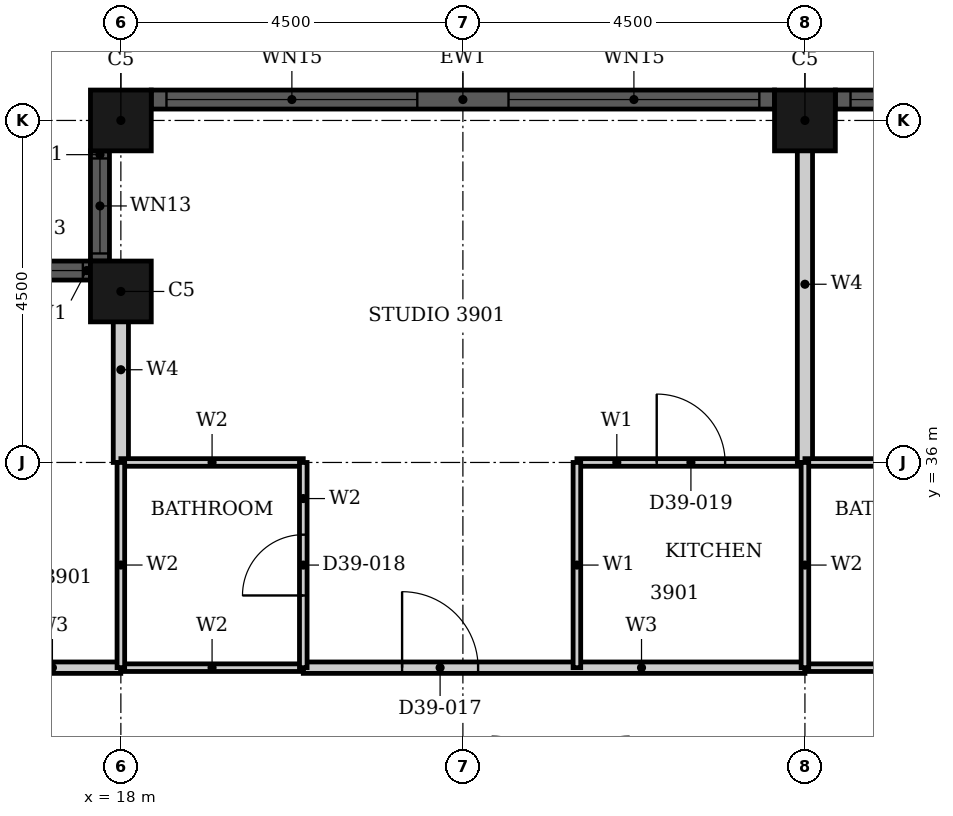
"""IFC4 building model, lengths in metres.
Left out: names, types, materials, properties, quantities, classifications, styles, units other than length and angle.
Written with IfcOpenShell. Run it as: python <this file> out.ifc"""

import sys

from ifc_helpers import new_model, si_unit, direction, frame, frame_2d, origin, origin_2d, place, context, subcontext, project, spatial, rectangle, hollow_rectangle, extrude, element, fill, save


model = new_model("IFC4")
c1 = context("Model", 3, precision=1e-05, world=origin(), true_north=direction((0.0, 1.0)))
c2 = subcontext(c1, "Body", "Model", "MODEL_VIEW")
j1 = project(units=[si_unit("LENGTHUNIT", "METRE"), si_unit("PLANEANGLEUNIT", "RADIAN")], contexts=[c1])
p1 = place(None, origin())
s1 = spatial("IfcSite", under=j1, at=p1, CompositionType="ELEMENT")
p2 = place(p1, origin())
s2 = spatial("IfcBuilding", under=s1, at=p2, CompositionType="ELEMENT")
p3 = place(p2, frame((0.0, 0.0, 158.0)))
s3 = spatial("IfcBuildingStorey", under=s2, at=p3, CompositionType="ELEMENT", Elevation=158.0)
for number, where, z_axis, x_axis in (
    (1, (27.0, 40.5, 0.0), (0.0, 0.0, 1.0), (1.0, 0.0, 0.0)),
    (2, (18.0, 40.5, 0.0), (0.0, 0.0, 1.0), (1.0, 0.0, 0.0)),
    (3, (18.0, 38.25, 0.0), (0.0, 0.0, 1.0), (1.0, 0.0, 0.0)),
):
    element("IfcColumn", number, at=place(p3, frame(where, z_axis=z_axis, x_axis=x_axis)), inside=s3, PredefinedType="COLUMN", context=c2, shape_type="SweptSolid", body=[
        extrude(hollow_rectangle(XDim=0.8, YDim=0.8, WallThickness=0.025, at=origin_2d()), origin(), (0.0, 0.0, 1.0), 3.7),
    ])
p4 = place(p3, frame((35.6, 40.775, 0.0), z_axis=(0.0, 0.0, 1.0), x_axis=(-1.0, 0.0, 0.0)))
e4 = element("IfcWall", 4, at=p4, inside=s3, PredefinedType="SOLIDWALL", context=c2, shape_type="SweptSolid", body=[
    extrude(rectangle(XDim=8.2, YDim=0.25, at=frame_2d((4.1, 0.0))), origin(), (0.0, 0.0, 1.0), 3.7),
])
p5 = place(p4, frame((0.2, 0.0, 0.45)))
e5 = element("IfcOpeningElement", 5, at=p5, cuts=e4, PredefinedType="OPENING", context=c2, shape_type="SweptSolid", body=[
    extrude(rectangle(XDim=3.3, YDim=2.3, at=frame_2d((1.65, 1.15))), frame((0.0, 0.135, 0.0), z_axis=(0.0, -1.0, 0.0), x_axis=(1.0, 0.0, 0.0)), (0.0, 0.0, 1.0), 0.27),
])
p6 = place(p4, frame((4.7, 0.0, 0.45)))
e6 = element("IfcOpeningElement", 6, at=p6, cuts=e4, PredefinedType="OPENING", context=c2, shape_type="SweptSolid", body=[
    extrude(rectangle(XDim=3.3, YDim=2.3, at=frame_2d((1.65, 1.15))), frame((0.0, 0.135, 0.0), z_axis=(0.0, -1.0, 0.0), x_axis=(1.0, 0.0, 0.0)), (0.0, 0.0, 1.0), 0.27),
])
p7 = place(p3, frame((26.6, 40.775, 0.0), z_axis=(0.0, 0.0, 1.0), x_axis=(-1.0, 0.0, 0.0)))
e7 = element("IfcWall", 7, at=p7, inside=s3, PredefinedType="SOLIDWALL", context=c2, shape_type="SweptSolid", body=[
    extrude(rectangle(XDim=8.2, YDim=0.25, at=frame_2d((4.1, 0.0))), origin(), (0.0, 0.0, 1.0), 3.7),
])
p8 = place(p7, frame((0.2, 0.0, 0.45)))
e8 = element("IfcOpeningElement", 8, at=p8, cuts=e7, PredefinedType="OPENING", context=c2, shape_type="SweptSolid", body=[
    extrude(rectangle(XDim=3.3, YDim=2.3, at=frame_2d((1.65, 1.15))), frame((0.0, 0.135, 0.0), z_axis=(0.0, -1.0, 0.0), x_axis=(1.0, 0.0, 0.0)), (0.0, 0.0, 1.0), 0.27),
])
p9 = place(p7, frame((4.7, 0.0, 0.45)))
e9 = element("IfcOpeningElement", 9, at=p9, cuts=e7, PredefinedType="OPENING", context=c2, shape_type="SweptSolid", body=[
    extrude(rectangle(XDim=3.3, YDim=2.3, at=frame_2d((1.65, 1.15))), frame((0.0, 0.135, 0.0), z_axis=(0.0, -1.0, 0.0), x_axis=(1.0, 0.0, 0.0)), (0.0, 0.0, 1.0), 0.27),
])
p10 = place(p3, frame((17.725, 40.1, 0.0), z_axis=(0.0, 0.0, 1.0), x_axis=(0.0, -1.0, 0.0)))
e10 = element("IfcWall", 10, at=p10, inside=s3, PredefinedType="SOLIDWALL", context=c2, shape_type="SweptSolid", body=[
    extrude(rectangle(XDim=1.45, YDim=0.25, at=frame_2d((0.725, 0.0))), origin(), (0.0, 0.0, 1.0), 3.7),
])
p11 = place(p10, frame((0.1, 0.0, 0.9)))
e11 = element("IfcOpeningElement", 11, at=p11, cuts=e10, PredefinedType="OPENING", context=c2, shape_type="SweptSolid", body=[
    extrude(rectangle(XDim=1.25, YDim=1.85, at=frame_2d((0.625, 0.925))), frame((0.0, 0.135, 0.0), z_axis=(0.0, -1.0, 0.0), x_axis=(1.0, 0.0, 0.0)), (0.0, 0.0, 1.0), 0.27),
])
p12 = place(p3, frame((17.6, 38.525, 0.0), z_axis=(0.0, 0.0, 1.0), x_axis=(-1.0, 0.0, 0.0)))
e12 = element("IfcWall", 12, at=p12, inside=s3, PredefinedType="SOLIDWALL", context=c2, shape_type="SweptSolid", body=[
    extrude(rectangle(XDim=1.45, YDim=0.25, at=frame_2d((0.725, 0.0))), origin(), (0.0, 0.0, 1.0), 3.7),
])
p13 = place(p12, frame((0.1, 0.0, 0.9)))
e13 = element("IfcOpeningElement", 13, at=p13, cuts=e12, PredefinedType="OPENING", context=c2, shape_type="SweptSolid", body=[
    extrude(rectangle(XDim=1.25, YDim=1.85, at=frame_2d((0.625, 0.925))), frame((0.0, 0.135, 0.0), z_axis=(0.0, -1.0, 0.0), x_axis=(1.0, 0.0, 0.0)), (0.0, 0.0, 1.0), 0.27),
])
p14 = place(p3, frame((20.4, 33.3, 0.0), z_axis=(0.0, 0.0, 1.0), x_axis=(1.0, 0.0, 0.0)))
e14 = element("IfcWall", 14, at=p14, inside=s3, PredefinedType="PARTITIONING", context=c2, shape_type="SweptSolid", body=[
    extrude(rectangle(XDim=6.6, YDim=0.15, at=frame_2d((3.3, 0.0))), origin(), (0.0, 0.0, 1.0), 3.4),
])
p15 = place(p14, frame((1.3, 0.0, 0.0)))
e15 = element("IfcOpeningElement", 15, at=p15, cuts=e14, PredefinedType="OPENING", context=c2, shape_type="SweptSolid", body=[
    extrude(rectangle(XDim=1.0, YDim=2.2, at=frame_2d((0.5, 1.1))), frame((0.0, 0.085, 0.0), z_axis=(0.0, -1.0, 0.0), x_axis=(1.0, 0.0, 0.0)), (0.0, 0.0, 1.0), 0.17),
])
p16 = place(p3, frame((16.2, 33.3, 0.0), z_axis=(0.0, 0.0, 1.0), x_axis=(1.0, 0.0, 0.0)))
e16 = element("IfcWall", 16, at=p16, inside=s3, PredefinedType="PARTITIONING", context=c2, shape_type="SweptSolid", body=[
    extrude(rectangle(XDim=1.799, YDim=0.15, at=frame_2d((0.899, 0.0))), origin(), (0.0, 0.0, 1.0), 3.4),
])
p17 = place(p3, frame((24.0, 36.0, 0.0), z_axis=(0.0, 0.0, 1.0), x_axis=(1.0, 0.0, 0.0)))
e17 = element("IfcWall", 17, at=p17, inside=s3, PredefinedType="PARTITIONING", context=c2, shape_type="SweptSolid", body=[
    extrude(rectangle(XDim=3.0, YDim=0.1, at=frame_2d((1.5, 0.0))), origin(), (0.0, 0.0, 1.0), 3.4),
])
p18 = place(p17, frame((1.05, 0.0, 0.0)))
e18 = element("IfcOpeningElement", 18, at=p18, cuts=e17, PredefinedType="OPENING", context=c2, shape_type="SweptSolid", body=[
    extrude(rectangle(XDim=0.9, YDim=2.1, at=frame_2d((0.45, 1.05))), frame((0.0, 0.06, 0.0), z_axis=(0.0, -1.0, 0.0), x_axis=(1.0, 0.0, 0.0)), (0.0, 0.0, 1.0), 0.12),
])
p19 = place(p3, frame((24.0, 33.3, 0.0), z_axis=(0.0, 0.0, 1.0), x_axis=(0.0, 1.0, 0.0)))
e19 = element("IfcWall", 19, at=p19, inside=s3, PredefinedType="PARTITIONING", context=c2, shape_type="SweptSolid", body=[
    extrude(rectangle(XDim=2.7, YDim=0.1, at=frame_2d((1.35, 0.0))), origin(), (0.0, 0.0, 1.0), 3.4),
])
p20 = place(p3, frame((18.0, 36.0, 0.0), z_axis=(0.0, 0.0, 1.0), x_axis=(0.0, 1.0, 0.0)))
e20 = element("IfcWall", 20, at=p20, inside=s3, PredefinedType="PARTITIONING", context=c2, shape_type="SweptSolid", body=[
    extrude(rectangle(XDim=2.44, YDim=0.2, at=frame_2d((1.22, 0.0))), origin(), (0.0, 0.0, 1.0), 3.4),
])
p21 = place(p3, frame((27.0, 36.0, 0.0), z_axis=(0.0, 0.0, 1.0), x_axis=(0.0, 1.0, 0.0)))
e21 = element("IfcWall", 21, at=p21, inside=s3, PredefinedType="PARTITIONING", context=c2, shape_type="SweptSolid", body=[
    extrude(rectangle(XDim=4.69, YDim=0.2, at=frame_2d((2.345, 0.0))), origin(), (0.0, 0.0, 1.0), 3.4),
])
for number, where, z_axis, x_axis in (
    (22, (18.0, 33.3, 0.0), (0.0, 0.0, 1.0), (1.0, 0.0, 0.0)),
    (23, (27.0, 33.3, 0.0), (0.0, 0.0, 1.0), (1.0, 0.0, 0.0)),
    (24, (18.0, 36.0, 0.0), (0.0, 0.0, 1.0), (1.0, 0.0, 0.0)),
    (25, (27.0, 36.0, 0.0), (0.0, 0.0, 1.0), (1.0, 0.0, 0.0)),
):
    element("IfcWall", number, at=place(p3, frame(where, z_axis=z_axis, x_axis=x_axis)), inside=s3, PredefinedType="PARTITIONING", context=c2, shape_type="SweptSolid", body=[
        extrude(rectangle(XDim=2.4, YDim=0.1, at=frame_2d((1.2, 0.0))), origin(), (0.0, 0.0, 1.0), 3.4),
    ])
p22 = place(p3, frame((18.0, 33.301, 0.0), z_axis=(0.0, 0.0, 1.0), x_axis=(0.0, 1.0, 0.0)))
e26 = element("IfcWall", 26, at=p22, inside=s3, PredefinedType="PARTITIONING", context=c2, shape_type="SweptSolid", body=[
    extrude(rectangle(XDim=2.699, YDim=0.1, at=frame_2d((1.35, 0.0))), origin(), (0.0, 0.0, 1.0), 3.4),
])
p23 = place(p3, frame((20.4, 33.3, 0.0), z_axis=(0.0, 0.0, 1.0), x_axis=(0.0, 1.0, 0.0)))
e27 = element("IfcWall", 27, at=p23, inside=s3, PredefinedType="PARTITIONING", context=c2, shape_type="SweptSolid", body=[
    extrude(rectangle(XDim=2.7, YDim=0.1, at=frame_2d((1.35, 0.0))), origin(), (0.0, 0.0, 1.0), 3.4),
])
p24 = place(p23, frame((0.95, 0.0, 0.0)))
e28 = element("IfcOpeningElement", 28, at=p24, cuts=e27, PredefinedType="OPENING", context=c2, shape_type="SweptSolid", body=[
    extrude(rectangle(XDim=0.8, YDim=2.1, at=frame_2d((0.4, 1.05))), frame((0.0, 0.06, 0.0), z_axis=(0.0, -1.0, 0.0), x_axis=(1.0, 0.0, 0.0)), (0.0, 0.0, 1.0), 0.12),
])
p25 = place(p3, frame((27.0, 33.3, 0.0), z_axis=(0.0, 0.0, 1.0), x_axis=(0.0, 1.0, 0.0)))
e29 = element("IfcWall", 29, at=p25, inside=s3, PredefinedType="PARTITIONING", context=c2, shape_type="SweptSolid", body=[
    extrude(rectangle(XDim=2.7, YDim=0.1, at=frame_2d((1.35, 0.0))), origin(), (0.0, 0.0, 1.0), 3.4),
])
p26 = place(p6, origin())
e30 = element("IfcWindow", 30, at=p26, inside=s3, PartitioningType="SINGLE_PANEL", PredefinedType="WINDOW", context=c2, shape_type="SweptSolid", body=[
    extrude(rectangle(XDim=3.3, YDim=2.3, at=frame_2d((1.65, 1.15))), frame((0.0, 0.03, 0.0), z_axis=(0.0, -1.0, 0.0), x_axis=(1.0, 0.0, 0.0)), (0.0, 0.0, 1.0), 0.06),
])
fill(e6, e30)
p27 = place(p8, origin())
e31 = element("IfcWindow", 31, at=p27, inside=s3, PartitioningType="SINGLE_PANEL", PredefinedType="WINDOW", context=c2, shape_type="SweptSolid", body=[
    extrude(rectangle(XDim=3.3, YDim=2.3, at=frame_2d((1.65, 1.15))), frame((0.0, 0.03, 0.0), z_axis=(0.0, -1.0, 0.0), x_axis=(1.0, 0.0, 0.0)), (0.0, 0.0, 1.0), 0.06),
])
fill(e8, e31)
p28 = place(p9, origin())
e32 = element("IfcWindow", 32, at=p28, inside=s3, PartitioningType="SINGLE_PANEL", PredefinedType="WINDOW", context=c2, shape_type="SweptSolid", body=[
    extrude(rectangle(XDim=3.3, YDim=2.3, at=frame_2d((1.65, 1.15))), frame((0.0, 0.03, 0.0), z_axis=(0.0, -1.0, 0.0), x_axis=(1.0, 0.0, 0.0)), (0.0, 0.0, 1.0), 0.06),
])
fill(e9, e32)
p29 = place(p11, origin())
e33 = element("IfcWindow", 33, at=p29, inside=s3, PartitioningType="SINGLE_PANEL", PredefinedType="WINDOW", context=c2, shape_type="SweptSolid", body=[
    extrude(rectangle(XDim=1.25, YDim=1.85, at=frame_2d((0.625, 0.925))), frame((0.0, 0.03, 0.0), z_axis=(0.0, -1.0, 0.0), x_axis=(1.0, 0.0, 0.0)), (0.0, 0.0, 1.0), 0.06),
])
fill(e11, e33)
p30 = place(p13, origin())
e34 = element("IfcWindow", 34, at=p30, inside=s3, PartitioningType="SINGLE_PANEL", PredefinedType="WINDOW", context=c2, shape_type="SweptSolid", body=[
    extrude(rectangle(XDim=1.25, YDim=1.85, at=frame_2d((0.625, 0.925))), frame((0.0, 0.03, 0.0), z_axis=(0.0, -1.0, 0.0), x_axis=(1.0, 0.0, 0.0)), (0.0, 0.0, 1.0), 0.06),
])
fill(e13, e34)
p31 = place(p15, origin())
e35 = element("IfcDoor", 35, at=p31, inside=s3, OperationType="SINGLE_SWING_LEFT", PredefinedType="DOOR", context=c2, shape_type="SweptSolid", body=[
    extrude(rectangle(XDim=1.0, YDim=2.2, at=frame_2d((0.5, 1.1))), frame((0.0, 0.025, 0.0), z_axis=(0.0, -1.0, 0.0), x_axis=(1.0, 0.0, 0.0)), (0.0, 0.0, 1.0), 0.05),
])
fill(e15, e35)
p32 = place(p24, origin())
e36 = element("IfcDoor", 36, at=p32, inside=s3, OperationType="SINGLE_SWING_LEFT", PredefinedType="DOOR", context=c2, shape_type="SweptSolid", body=[
    extrude(rectangle(XDim=0.8, YDim=2.1, at=frame_2d((0.4, 1.05))), frame((0.0, 0.025, 0.0), z_axis=(0.0, -1.0, 0.0), x_axis=(1.0, 0.0, 0.0)), (0.0, 0.0, 1.0), 0.05),
])
fill(e28, e36)
p33 = place(p18, origin())
e37 = element("IfcDoor", 37, at=p33, inside=s3, OperationType="SINGLE_SWING_LEFT", PredefinedType="DOOR", context=c2, shape_type="SweptSolid", body=[
    extrude(rectangle(XDim=0.9, YDim=2.1, at=frame_2d((0.45, 1.05))), frame((0.0, 0.025, 0.0), z_axis=(0.0, -1.0, 0.0), x_axis=(1.0, 0.0, 0.0)), (0.0, 0.0, 1.0), 0.05),
])
fill(e18, e37)
save(model, sys.argv[1])
